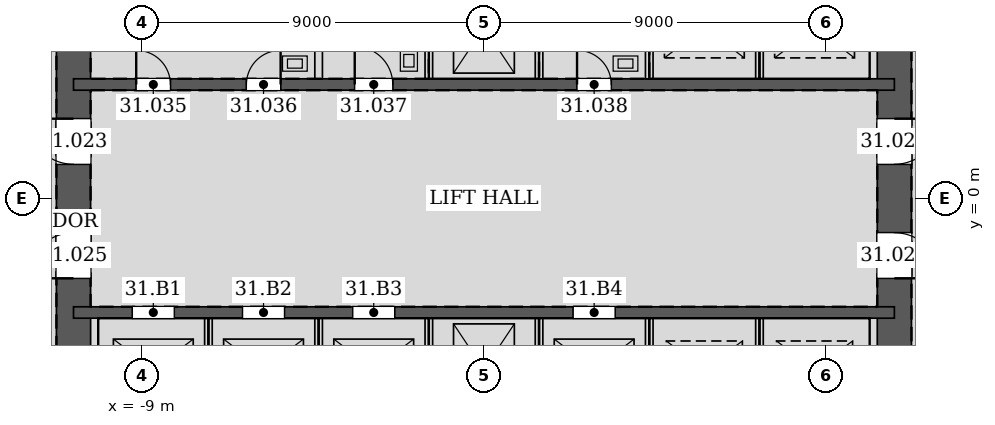
"""IFC4 building model, lengths in metres.
Left out: names, types, materials, properties, quantities, classifications, styles, units other than length and angle.
Written with IfcOpenShell. Run it as: python <this file> out.ifc"""

import sys

from ifc_helpers import new_model, si_unit, direction, frame, frame_2d, origin, place, context, subcontext, project, spatial, rectangle, extrude, element, fill, save


model = new_model("IFC4")
c1 = context("Model", 3, precision=1e-05, world=origin(), true_north=direction((0.0, 1.0)))
c2 = subcontext(c1, "Body", "Model", "MODEL_VIEW")
j1 = project(units=[si_unit("LENGTHUNIT", "METRE"), si_unit("PLANEANGLEUNIT", "RADIAN")], contexts=[c1])
p1 = place(None, origin())
s1 = spatial("IfcSite", under=j1, at=p1, CompositionType="ELEMENT")
p2 = place(p1, origin())
s2 = spatial("IfcBuilding", under=s1, at=p2, CompositionType="ELEMENT")
p3 = place(p2, frame((0.0, 0.0, 138.6)))
s3 = spatial("IfcBuildingStorey", under=s2, at=p3, CompositionType="ELEMENT", Elevation=138.6)
p4 = place(p3, frame((10.8, -10.8, 0.0), z_axis=(0.0, 0.0, 1.0), x_axis=(0.0, 1.0, 0.0)))
e1 = element("IfcWall", 1, at=p4, inside=s3, PredefinedType="SOLIDWALL", context=c2, shape_type="SweptSolid", body=[
    extrude(rectangle(XDim=21.6, YDim=0.9, at=frame_2d((10.8, 0.0))), origin(), (0.0, 0.0, 1.0), 4.2),
])
p5 = place(p4, frame((11.7, 0.0, 0.0)))
e2 = element("IfcOpeningElement", 2, at=p5, cuts=e1, PredefinedType="OPENING", context=c2, shape_type="SweptSolid", body=[
    extrude(rectangle(XDim=1.2, YDim=2.1, at=frame_2d((0.6, 1.05))), frame((0.0, 0.46, 0.0), z_axis=(0.0, -1.0, 0.0), x_axis=(1.0, 0.0, 0.0)), (0.0, 0.0, 1.0), 0.92),
])
p6 = place(p4, frame((8.7, 0.0, 0.0)))
e3 = element("IfcOpeningElement", 3, at=p6, cuts=e1, PredefinedType="OPENING", context=c2, shape_type="SweptSolid", body=[
    extrude(rectangle(XDim=1.2, YDim=2.1, at=frame_2d((0.6, 1.05))), frame((0.0, 0.46, 0.0), z_axis=(0.0, -1.0, 0.0), x_axis=(1.0, 0.0, 0.0)), (0.0, 0.0, 1.0), 0.92),
])
p7 = place(p3, frame((-10.8, 10.8, 0.0), z_axis=(0.0, 0.0, 1.0), x_axis=(0.0, -1.0, 0.0)))
e4 = element("IfcWall", 4, at=p7, inside=s3, PredefinedType="SOLIDWALL", context=c2, shape_type="SweptSolid", body=[
    extrude(rectangle(XDim=21.6, YDim=0.9, at=frame_2d((10.8, 0.0))), origin(), (0.0, 0.0, 1.0), 4.2),
])
p8 = place(p7, frame((8.7, 0.0, 0.0)))
e5 = element("IfcOpeningElement", 5, at=p8, cuts=e4, PredefinedType="OPENING", context=c2, shape_type="SweptSolid", body=[
    extrude(rectangle(XDim=1.2, YDim=2.1, at=frame_2d((0.6, 1.05))), frame((0.0, 0.46, 0.0), z_axis=(0.0, -1.0, 0.0), x_axis=(1.0, 0.0, 0.0)), (0.0, 0.0, 1.0), 0.92),
])
p9 = place(p7, frame((11.7, 0.0, 0.0)))
e6 = element("IfcOpeningElement", 6, at=p9, cuts=e4, PredefinedType="OPENING", context=c2, shape_type="SweptSolid", body=[
    extrude(rectangle(XDim=1.2, YDim=2.1, at=frame_2d((0.6, 1.05))), frame((0.0, 0.46, 0.0), z_axis=(0.0, -1.0, 0.0), x_axis=(1.0, 0.0, 0.0)), (0.0, 0.0, 1.0), 0.92),
])
p10 = place(p3, frame((-10.8, 3.0, 0.0), z_axis=(0.0, 0.0, 1.0), x_axis=(1.0, 0.0, 0.0)))
e7 = element("IfcWall", 7, at=p10, inside=s3, PredefinedType="SOLIDWALL", context=c2, shape_type="SweptSolid", body=[
    extrude(rectangle(XDim=21.6, YDim=0.3, at=frame_2d((10.8, 0.0))), origin(), (0.0, 0.0, 1.0), 4.2),
])
p11 = place(p10, frame((1.65, 0.0, 0.0)))
e8 = element("IfcOpeningElement", 8, at=p11, cuts=e7, PredefinedType="OPENING", context=c2, shape_type="SweptSolid", body=[
    extrude(rectangle(XDim=0.9, YDim=2.1, at=frame_2d((0.45, 1.05))), frame((0.0, 0.16, 0.0), z_axis=(0.0, -1.0, 0.0), x_axis=(1.0, 0.0, 0.0)), (0.0, 0.0, 1.0), 0.32),
])
p12 = place(p10, frame((4.55, 0.0, 0.0)))
e9 = element("IfcOpeningElement", 9, at=p12, cuts=e7, PredefinedType="OPENING", context=c2, shape_type="SweptSolid", body=[
    extrude(rectangle(XDim=0.9, YDim=2.1, at=frame_2d((0.45, 1.05))), frame((0.0, 0.16, 0.0), z_axis=(0.0, -1.0, 0.0), x_axis=(1.0, 0.0, 0.0)), (0.0, 0.0, 1.0), 0.32),
])
p13 = place(p10, frame((7.4, 0.0, 0.0)))
e10 = element("IfcOpeningElement", 10, at=p13, cuts=e7, PredefinedType="OPENING", context=c2, shape_type="SweptSolid", body=[
    extrude(rectangle(XDim=1.0, YDim=2.1, at=frame_2d((0.5, 1.05))), frame((0.0, 0.16, 0.0), z_axis=(0.0, -1.0, 0.0), x_axis=(1.0, 0.0, 0.0)), (0.0, 0.0, 1.0), 0.32),
])
p14 = place(p10, frame((13.25, 0.0, 0.0)))
e11 = element("IfcOpeningElement", 11, at=p14, cuts=e7, PredefinedType="OPENING", context=c2, shape_type="SweptSolid", body=[
    extrude(rectangle(XDim=0.9, YDim=2.1, at=frame_2d((0.45, 1.05))), frame((0.0, 0.16, 0.0), z_axis=(0.0, -1.0, 0.0), x_axis=(1.0, 0.0, 0.0)), (0.0, 0.0, 1.0), 0.32),
])
p15 = place(p3, frame((-10.8, -3.0, 0.0), z_axis=(0.0, 0.0, 1.0), x_axis=(1.0, 0.0, 0.0)))
e12 = element("IfcWall", 12, at=p15, inside=s3, PredefinedType="SOLIDWALL", context=c2, shape_type="SweptSolid", body=[
    extrude(rectangle(XDim=21.6, YDim=0.3, at=frame_2d((10.8, 0.0))), origin(), (0.0, 0.0, 1.0), 4.2),
])
p16 = place(p15, frame((1.55, 0.0, 0.0)))
e13 = element("IfcOpeningElement", 13, at=p16, cuts=e12, PredefinedType="OPENING", context=c2, shape_type="SweptSolid", body=[
    extrude(rectangle(XDim=1.1, YDim=2.1, at=frame_2d((0.55, 1.05))), frame((0.0, 0.16, 0.0), z_axis=(0.0, -1.0, 0.0), x_axis=(1.0, 0.0, 0.0)), (0.0, 0.0, 1.0), 0.32),
])
p17 = place(p15, frame((4.45, 0.0, 0.0)))
e14 = element("IfcOpeningElement", 14, at=p17, cuts=e12, PredefinedType="OPENING", context=c2, shape_type="SweptSolid", body=[
    extrude(rectangle(XDim=1.1, YDim=2.1, at=frame_2d((0.55, 1.05))), frame((0.0, 0.16, 0.0), z_axis=(0.0, -1.0, 0.0), x_axis=(1.0, 0.0, 0.0)), (0.0, 0.0, 1.0), 0.32),
])
p18 = place(p15, frame((7.35, 0.0, 0.0)))
e15 = element("IfcOpeningElement", 15, at=p18, cuts=e12, PredefinedType="OPENING", context=c2, shape_type="SweptSolid", body=[
    extrude(rectangle(XDim=1.1, YDim=2.1, at=frame_2d((0.55, 1.05))), frame((0.0, 0.16, 0.0), z_axis=(0.0, -1.0, 0.0), x_axis=(1.0, 0.0, 0.0)), (0.0, 0.0, 1.0), 0.32),
])
p19 = place(p15, frame((13.15, 0.0, 0.0)))
e16 = element("IfcOpeningElement", 16, at=p19, cuts=e12, PredefinedType="OPENING", context=c2, shape_type="SweptSolid", body=[
    extrude(rectangle(XDim=1.1, YDim=2.1, at=frame_2d((0.55, 1.05))), frame((0.0, 0.16, 0.0), z_axis=(0.0, -1.0, 0.0), x_axis=(1.0, 0.0, 0.0)), (0.0, 0.0, 1.0), 0.32),
])
for number, where, z_axis, x_axis in (
    (17, (-4.35, 3.15, 0.0), (0.0, 0.0, 1.0), (0.0, 1.0, 0.0)),
    (18, (-1.45, 3.15, 0.0), (0.0, 0.0, 1.0), (0.0, 1.0, 0.0)),
    (19, (1.45, 3.15, 0.0), (0.0, 0.0, 1.0), (0.0, 1.0, 0.0)),
    (20, (4.35, 3.15, 0.0), (0.0, 0.0, 1.0), (0.0, 1.0, 0.0)),
):
    element("IfcWall", number, at=place(p3, frame(where, z_axis=z_axis, x_axis=x_axis)), inside=s3, PredefinedType="PARTITIONING", context=c2, shape_type="SweptSolid", body=[
        extrude(rectangle(XDim=2.7, YDim=0.2, at=frame_2d((1.35, 0.0))), origin(), (0.0, 0.0, 1.0), 4.035),
    ])
for number, where, z_axis, x_axis in (
    (21, (7.25, 3.15, 0.0), (0.0, 0.0, 1.0), (0.0, 1.0, 0.0)),
    (22, (-7.25, -5.85, 0.0), (0.0, 0.0, 1.0), (0.0, 1.0, 0.0)),
    (23, (-4.35, -5.85, 0.0), (0.0, 0.0, 1.0), (0.0, 1.0, 0.0)),
    (24, (-1.45, -5.85, 0.0), (0.0, 0.0, 1.0), (0.0, 1.0, 0.0)),
    (25, (1.45, -5.85, 0.0), (0.0, 0.0, 1.0), (0.0, 1.0, 0.0)),
    (26, (4.35, -5.85, 0.0), (0.0, 0.0, 1.0), (0.0, 1.0, 0.0)),
    (27, (7.25, -5.85, 0.0), (0.0, 0.0, 1.0), (0.0, 1.0, 0.0)),
):
    element("IfcWall", number, at=place(p3, frame(where, z_axis=z_axis, x_axis=x_axis)), inside=s3, PredefinedType="PARTITIONING", context=c2, shape_type="SweptSolid", body=[
        extrude(rectangle(XDim=2.7, YDim=0.2, at=frame_2d((1.35, 0.0))), origin(), (0.0, 0.0, 1.0), 4.2),
    ])
p20 = place(p5, frame((1.2, 0.0, 0.0), z_axis=(0.0, 0.0, 1.0), x_axis=(-1.0, 0.0, 0.0)))
e28 = element("IfcDoor", 28, at=p20, inside=s3, OperationType="SINGLE_SWING_LEFT", PredefinedType="DOOR", context=c2, shape_type="SweptSolid", body=[
    extrude(rectangle(XDim=1.2, YDim=2.1, at=frame_2d((0.6, 1.05))), frame((0.0, 0.025, 0.0), z_axis=(0.0, -1.0, 0.0), x_axis=(1.0, 0.0, 0.0)), (0.0, 0.0, 1.0), 0.05),
])
fill(e2, e28)
p21 = place(p8, frame((1.2, 0.0, 0.0), z_axis=(0.0, 0.0, 1.0), x_axis=(-1.0, 0.0, 0.0)))
e29 = element("IfcDoor", 29, at=p21, inside=s3, OperationType="SINGLE_SWING_RIGHT", PredefinedType="DOOR", context=c2, shape_type="SweptSolid", body=[
    extrude(rectangle(XDim=1.2, YDim=2.1, at=frame_2d((0.6, 1.05))), frame((0.0, 0.025, 0.0), z_axis=(0.0, -1.0, 0.0), x_axis=(1.0, 0.0, 0.0)), (0.0, 0.0, 1.0), 0.05),
])
fill(e5, e29)
p22 = place(p6, frame((1.2, 0.0, 0.0), z_axis=(0.0, 0.0, 1.0), x_axis=(-1.0, 0.0, 0.0)))
e30 = element("IfcDoor", 30, at=p22, inside=s3, OperationType="SINGLE_SWING_RIGHT", PredefinedType="DOOR", context=c2, shape_type="SweptSolid", body=[
    extrude(rectangle(XDim=1.2, YDim=2.1, at=frame_2d((0.6, 1.05))), frame((0.0, 0.025, 0.0), z_axis=(0.0, -1.0, 0.0), x_axis=(1.0, 0.0, 0.0)), (0.0, 0.0, 1.0), 0.05),
])
fill(e3, e30)
p23 = place(p9, frame((1.2, 0.0, 0.0), z_axis=(0.0, 0.0, 1.0), x_axis=(-1.0, 0.0, 0.0)))
e31 = element("IfcDoor", 31, at=p23, inside=s3, OperationType="SINGLE_SWING_LEFT", PredefinedType="DOOR", context=c2, shape_type="SweptSolid", body=[
    extrude(rectangle(XDim=1.2, YDim=2.1, at=frame_2d((0.6, 1.05))), frame((0.0, 0.025, 0.0), z_axis=(0.0, -1.0, 0.0), x_axis=(1.0, 0.0, 0.0)), (0.0, 0.0, 1.0), 0.05),
])
fill(e6, e31)
p24 = place(p11, origin())
e32 = element("IfcDoor", 32, at=p24, inside=s3, OperationType="SINGLE_SWING_LEFT", PredefinedType="DOOR", context=c2, shape_type="SweptSolid", body=[
    extrude(rectangle(XDim=0.9, YDim=2.1, at=frame_2d((0.45, 1.05))), frame((0.0, 0.025, 0.0), z_axis=(0.0, -1.0, 0.0), x_axis=(1.0, 0.0, 0.0)), (0.0, 0.0, 1.0), 0.05),
])
fill(e8, e32)
p25 = place(p12, origin())
e33 = element("IfcDoor", 33, at=p25, inside=s3, OperationType="SINGLE_SWING_RIGHT", PredefinedType="DOOR", context=c2, shape_type="SweptSolid", body=[
    extrude(rectangle(XDim=0.9, YDim=2.1, at=frame_2d((0.45, 1.05))), frame((0.0, 0.025, 0.0), z_axis=(0.0, -1.0, 0.0), x_axis=(1.0, 0.0, 0.0)), (0.0, 0.0, 1.0), 0.05),
])
fill(e9, e33)
p26 = place(p13, origin())
e34 = element("IfcDoor", 34, at=p26, inside=s3, OperationType="SINGLE_SWING_LEFT", PredefinedType="DOOR", context=c2, shape_type="SweptSolid", body=[
    extrude(rectangle(XDim=1.0, YDim=2.1, at=frame_2d((0.5, 1.05))), frame((0.0, 0.025, 0.0), z_axis=(0.0, -1.0, 0.0), x_axis=(1.0, 0.0, 0.0)), (0.0, 0.0, 1.0), 0.05),
])
fill(e10, e34)
p27 = place(p14, origin())
e35 = element("IfcDoor", 35, at=p27, inside=s3, OperationType="SINGLE_SWING_LEFT", PredefinedType="DOOR", context=c2, shape_type="SweptSolid", body=[
    extrude(rectangle(XDim=0.9, YDim=2.1, at=frame_2d((0.45, 1.05))), frame((0.0, 0.025, 0.0), z_axis=(0.0, -1.0, 0.0), x_axis=(1.0, 0.0, 0.0)), (0.0, 0.0, 1.0), 0.05),
])
fill(e11, e35)
p28 = place(p16, origin())
e36 = element("IfcDoor", 36, at=p28, inside=s3, OperationType="DOUBLE_DOOR_SLIDING", PredefinedType="DOOR", context=c2, shape_type="SweptSolid", body=[
    extrude(rectangle(XDim=1.1, YDim=2.1, at=frame_2d((0.55, 1.05))), frame((0.0, 0.025, 0.0), z_axis=(0.0, -1.0, 0.0), x_axis=(1.0, 0.0, 0.0)), (0.0, 0.0, 1.0), 0.05),
])
fill(e13, e36)
p29 = place(p17, origin())
e37 = element("IfcDoor", 37, at=p29, inside=s3, OperationType="DOUBLE_DOOR_SLIDING", PredefinedType="DOOR", context=c2, shape_type="SweptSolid", body=[
    extrude(rectangle(XDim=1.1, YDim=2.1, at=frame_2d((0.55, 1.05))), frame((0.0, 0.025, 0.0), z_axis=(0.0, -1.0, 0.0), x_axis=(1.0, 0.0, 0.0)), (0.0, 0.0, 1.0), 0.05),
])
fill(e14, e37)
p30 = place(p18, origin())
e38 = element("IfcDoor", 38, at=p30, inside=s3, OperationType="DOUBLE_DOOR_SLIDING", PredefinedType="DOOR", context=c2, shape_type="SweptSolid", body=[
    extrude(rectangle(XDim=1.1, YDim=2.1, at=frame_2d((0.55, 1.05))), frame((0.0, 0.025, 0.0), z_axis=(0.0, -1.0, 0.0), x_axis=(1.0, 0.0, 0.0)), (0.0, 0.0, 1.0), 0.05),
])
fill(e15, e38)
p31 = place(p19, origin())
e39 = element("IfcDoor", 39, at=p31, inside=s3, OperationType="DOUBLE_DOOR_SLIDING", PredefinedType="DOOR", context=c2, shape_type="SweptSolid", body=[
    extrude(rectangle(XDim=1.1, YDim=2.1, at=frame_2d((0.55, 1.05))), frame((0.0, 0.025, 0.0), z_axis=(0.0, -1.0, 0.0), x_axis=(1.0, 0.0, 0.0)), (0.0, 0.0, 1.0), 0.05),
])
fill(e16, e39)
save(model, sys.argv[1])
